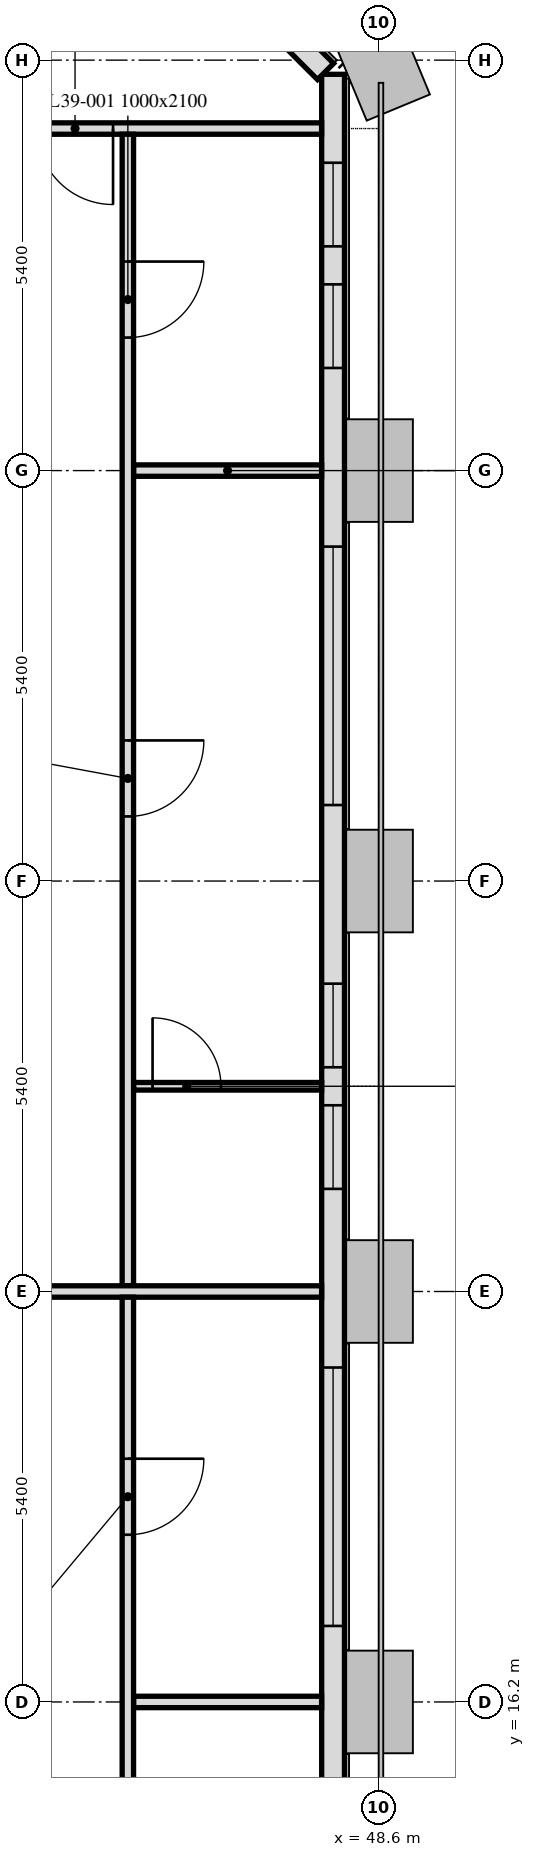
"""IFC4 building model, lengths in metres.
Left out: names, types, materials, properties, quantities, classifications, styles, units other than length and angle.
Written with IfcOpenShell. Run it as: python <this file> out.ifc"""

import sys

from ifc_helpers import new_model, si_unit, direction, frame, frame_2d, origin, place, context, subcontext, project, spatial, rectangle, extrude, element, fill, save


model = new_model("IFC4")
c1 = context("Model", 3, precision=1e-05, world=origin(), true_north=direction((0.0, 1.0)))
c2 = subcontext(c1, "Body", "Model", "MODEL_VIEW")
j1 = project(units=[si_unit("LENGTHUNIT", "METRE"), si_unit("PLANEANGLEUNIT", "RADIAN")], contexts=[c1])
p1 = place(None, origin())
s1 = spatial("IfcSite", under=j1, at=p1, CompositionType="ELEMENT")
p2 = place(p1, origin())
s2 = spatial("IfcBuilding", under=s1, at=p2, CompositionType="ELEMENT")
p3 = place(p2, frame((0.0, 0.0, 166.0)))
s3 = spatial("IfcBuildingStorey", under=s2, at=p3, CompositionType="ELEMENT", Elevation=166.0)
p4 = place(p3, frame((48.0, 5.586, 0.0), z_axis=(0.0, 0.0, 1.0), x_axis=(0.0, 1.0, 0.0)))
e1 = element("IfcWall", 1, at=p4, inside=s3, PredefinedType="SOLIDWALL", context=c2, shape_type="SweptSolid", body=[
    extrude(rectangle(XDim=32.027, YDim=0.3, at=frame_2d((16.014, 0.0))), origin(), (0.0, 0.0, 1.0), 3.0),
])
p5 = place(p4, frame((1.164, 0.0, 0.9)))
e2 = element("IfcOpeningElement", 2, at=p5, cuts=e1, PredefinedType="OPENING", context=c2, shape_type="SweptSolid", body=[
    extrude(rectangle(XDim=1.1, YDim=1.7, at=frame_2d((0.55, 0.85))), frame((0.0, 0.16, 0.0), z_axis=(0.0, -1.0, 0.0), x_axis=(1.0, 0.0, 0.0)), (0.0, 0.0, 1.0), 0.32),
])
p6 = place(p4, frame((2.589, 0.0, 0.9)))
e3 = element("IfcOpeningElement", 3, at=p6, cuts=e1, PredefinedType="OPENING", context=c2, shape_type="SweptSolid", body=[
    extrude(rectangle(XDim=0.65, YDim=1.7, at=frame_2d((0.325, 0.85))), frame((0.0, 0.16, 0.0), z_axis=(0.0, -1.0, 0.0), x_axis=(1.0, 0.0, 0.0)), (0.0, 0.0, 1.0), 0.32),
])
p7 = place(p4, frame((6.564, 0.0, 0.9)))
e4 = element("IfcOpeningElement", 4, at=p7, cuts=e1, PredefinedType="OPENING", context=c2, shape_type="SweptSolid", body=[
    extrude(rectangle(XDim=1.1, YDim=1.7, at=frame_2d((0.55, 0.85))), frame((0.0, 0.16, 0.0), z_axis=(0.0, -1.0, 0.0), x_axis=(1.0, 0.0, 0.0)), (0.0, 0.0, 1.0), 0.32),
])
p8 = place(p4, frame((8.164, 0.0, 0.9)))
e5 = element("IfcOpeningElement", 5, at=p8, cuts=e1, PredefinedType="OPENING", context=c2, shape_type="SweptSolid", body=[
    extrude(rectangle(XDim=1.1, YDim=1.7, at=frame_2d((0.55, 0.85))), frame((0.0, 0.16, 0.0), z_axis=(0.0, -1.0, 0.0), x_axis=(1.0, 0.0, 0.0)), (0.0, 0.0, 1.0), 0.32),
])
p9 = place(p4, frame((11.614, 0.0, 0.9)))
e6 = element("IfcOpeningElement", 6, at=p9, cuts=e1, PredefinedType="OPENING", context=c2, shape_type="SweptSolid", body=[
    extrude(rectangle(XDim=3.4, YDim=1.7, at=frame_2d((1.7, 0.85))), frame((0.0, 0.16, 0.0), z_axis=(0.0, -1.0, 0.0), x_axis=(1.0, 0.0, 0.0)), (0.0, 0.0, 1.0), 0.32),
])
p10 = place(p4, frame((17.364, 0.0, 0.9)))
e7 = element("IfcOpeningElement", 7, at=p10, cuts=e1, PredefinedType="OPENING", context=c2, shape_type="SweptSolid", body=[
    extrude(rectangle(XDim=1.1, YDim=1.7, at=frame_2d((0.55, 0.85))), frame((0.0, 0.16, 0.0), z_axis=(0.0, -1.0, 0.0), x_axis=(1.0, 0.0, 0.0)), (0.0, 0.0, 1.0), 0.32),
])
p11 = place(p4, frame((18.964, 0.0, 0.9)))
e8 = element("IfcOpeningElement", 8, at=p11, cuts=e1, PredefinedType="OPENING", context=c2, shape_type="SweptSolid", body=[
    extrude(rectangle(XDim=1.1, YDim=1.7, at=frame_2d((0.55, 0.85))), frame((0.0, 0.16, 0.0), z_axis=(0.0, -1.0, 0.0), x_axis=(1.0, 0.0, 0.0)), (0.0, 0.0, 1.0), 0.32),
])
p12 = place(p4, frame((22.414, 0.0, 0.9)))
e9 = element("IfcOpeningElement", 9, at=p12, cuts=e1, PredefinedType="OPENING", context=c2, shape_type="SweptSolid", body=[
    extrude(rectangle(XDim=3.4, YDim=1.7, at=frame_2d((1.7, 0.85))), frame((0.0, 0.16, 0.0), z_axis=(0.0, -1.0, 0.0), x_axis=(1.0, 0.0, 0.0)), (0.0, 0.0, 1.0), 0.32),
])
p13 = place(p4, frame((28.164, 0.0, 0.9)))
e10 = element("IfcOpeningElement", 10, at=p13, cuts=e1, PredefinedType="OPENING", context=c2, shape_type="SweptSolid", body=[
    extrude(rectangle(XDim=1.1, YDim=1.7, at=frame_2d((0.55, 0.85))), frame((0.0, 0.16, 0.0), z_axis=(0.0, -1.0, 0.0), x_axis=(1.0, 0.0, 0.0)), (0.0, 0.0, 1.0), 0.32),
])
p14 = place(p4, frame((29.764, 0.0, 0.9)))
e11 = element("IfcOpeningElement", 11, at=p14, cuts=e1, PredefinedType="OPENING", context=c2, shape_type="SweptSolid", body=[
    extrude(rectangle(XDim=1.1, YDim=1.7, at=frame_2d((0.55, 0.85))), frame((0.0, 0.16, 0.0), z_axis=(0.0, -1.0, 0.0), x_axis=(1.0, 0.0, 0.0)), (0.0, 0.0, 1.0), 0.32),
])
p15 = place(p3, frame((47.901, 37.65, 0.0), z_axis=(0.0, 0.0, 1.0), x_axis=(-0.707106781187, 0.707106781187, 0.0)))
e12 = element("IfcWall", 12, at=p15, inside=s3, PredefinedType="SOLIDWALL", context=c2, shape_type="SweptSolid", body=[
    extrude(rectangle(XDim=6.86, YDim=0.3, at=frame_2d((3.43, 0.0))), origin(), (0.0, 0.0, 1.0), 3.0),
])
p16 = place(p15, frame((1.73, 0.0, 0.9)))
e13 = element("IfcOpeningElement", 13, at=p16, cuts=e12, PredefinedType="OPENING", context=c2, shape_type="SweptSolid", body=[
    extrude(rectangle(XDim=3.4, YDim=1.7, at=frame_2d((1.7, 0.85))), frame((0.0, 0.16, 0.0), z_axis=(0.0, -1.0, 0.0), x_axis=(1.0, 0.0, 0.0)), (0.0, 0.0, 1.0), 0.32),
])
p17 = place(p3, frame((45.375, 32.4, 0.0), z_axis=(0.0, 0.0, 1.0), x_axis=(1.0, 0.0, 0.0)))
e14 = element("IfcWall", 14, at=p17, inside=s3, PredefinedType="PARTITIONING", context=c2, shape_type="SweptSolid", body=[
    extrude(rectangle(XDim=2.474, YDim=0.15, at=frame_2d((1.237, 0.0))), origin(), (0.0, 0.0, 1.0), 2.4),
])
p18 = place(p3, frame((47.849, 36.9, 0.0), z_axis=(0.0, 0.0, 1.0), x_axis=(-1.0, 0.0, 0.0)))
e15 = element("IfcWall", 15, at=p18, inside=s3, PredefinedType="PARTITIONING", context=c2, shape_type="SweptSolid", body=[
    extrude(rectangle(XDim=41.698, YDim=0.15, at=frame_2d((20.849, 0.0))), origin(), (0.0, 0.0, 1.0), 3.0),
])
p19 = place(p18, frame((39.249, 0.0, 0.0)))
e16 = element("IfcOpeningElement", 16, at=p19, cuts=e15, PredefinedType="OPENING", context=c2, shape_type="SweptSolid", body=[
    extrude(rectangle(XDim=1.0, YDim=2.1, at=frame_2d((0.5, 1.05))), frame((0.0, 0.075, 0.0), z_axis=(0.0, -1.0, 0.0), x_axis=(1.0, 0.0, 0.0)), (0.0, 0.0, 1.0), 0.15),
])
p20 = place(p18, frame((28.449, 0.0, 0.0)))
e17 = element("IfcOpeningElement", 17, at=p20, cuts=e15, PredefinedType="OPENING", context=c2, shape_type="SweptSolid", body=[
    extrude(rectangle(XDim=1.0, YDim=2.1, at=frame_2d((0.5, 1.05))), frame((0.0, 0.075, 0.0), z_axis=(0.0, -1.0, 0.0), x_axis=(1.0, 0.0, 0.0)), (0.0, 0.0, 1.0), 0.15),
])
p21 = place(p18, frame((16.849, 0.0, 0.0)))
e18 = element("IfcOpeningElement", 18, at=p21, cuts=e15, PredefinedType="OPENING", context=c2, shape_type="SweptSolid", body=[
    extrude(rectangle(XDim=1.0, YDim=2.1, at=frame_2d((0.5, 1.05))), frame((0.0, 0.075, 0.0), z_axis=(0.0, -1.0, 0.0), x_axis=(1.0, 0.0, 0.0)), (0.0, 0.0, 1.0), 0.15),
])
p22 = place(p18, frame((11.449, 0.0, 0.0)))
e19 = element("IfcOpeningElement", 19, at=p22, cuts=e15, PredefinedType="OPENING", context=c2, shape_type="SweptSolid", body=[
    extrude(rectangle(XDim=1.0, YDim=2.1, at=frame_2d((0.5, 1.05))), frame((0.0, 0.075, 0.0), z_axis=(0.0, -1.0, 0.0), x_axis=(1.0, 0.0, 0.0)), (0.0, 0.0, 1.0), 0.15),
])
p23 = place(p18, frame((2.744, 0.0, 0.0)))
e20 = element("IfcOpeningElement", 20, at=p23, cuts=e15, PredefinedType="OPENING", context=c2, shape_type="SweptSolid", body=[
    extrude(rectangle(XDim=1.0, YDim=2.1, at=frame_2d((0.5, 1.05))), frame((0.0, 0.075, 0.0), z_axis=(0.0, -1.0, 0.0), x_axis=(1.0, 0.0, 0.0)), (0.0, 0.0, 1.0), 0.15),
])
p24 = place(p3, frame((45.375, 24.3, 0.0), z_axis=(0.0, 0.0, 1.0), x_axis=(1.0, 0.0, 0.0)))
e21 = element("IfcWall", 21, at=p24, inside=s3, PredefinedType="PARTITIONING", context=c2, shape_type="SweptSolid", body=[
    extrude(rectangle(XDim=2.474, YDim=0.1, at=frame_2d((1.237, 0.0))), origin(), (0.0, 0.0, 1.0), 3.0),
])
p25 = place(p24, frame((0.25, 0.0, 0.0)))
e22 = element("IfcOpeningElement", 22, at=p25, cuts=e21, PredefinedType="OPENING", context=c2, shape_type="SweptSolid", body=[
    extrude(rectangle(XDim=0.9, YDim=2.1, at=frame_2d((0.45, 1.05))), frame((0.0, 0.05, 0.0), z_axis=(0.0, -1.0, 0.0), x_axis=(1.0, 0.0, 0.0)), (0.0, 0.0, 1.0), 0.1),
])
p26 = place(p3, frame((45.3, 36.825, 0.0), z_axis=(0.0, 0.0, 1.0), x_axis=(0.0, -1.0, 0.0)))
e23 = element("IfcWall", 23, at=p26, inside=s3, PredefinedType="PARTITIONING", context=c2, shape_type="SweptSolid", body=[
    extrude(rectangle(XDim=15.15, YDim=0.15, at=frame_2d((7.575, 0.0))), origin(), (0.0, 0.0, 1.0), 2.4),
])
p27 = place(p26, frame((1.675, 0.0, 0.0)))
e24 = element("IfcOpeningElement", 24, at=p27, cuts=e23, PredefinedType="OPENING", context=c2, shape_type="SweptSolid", body=[
    extrude(rectangle(XDim=1.0, YDim=2.1, at=frame_2d((0.5, 1.05))), frame((0.0, 0.075, 0.0), z_axis=(0.0, -1.0, 0.0), x_axis=(1.0, 0.0, 0.0)), (0.0, 0.0, 1.0), 0.15),
])
p28 = place(p26, frame((7.975, 0.0, 0.0)))
e25 = element("IfcOpeningElement", 25, at=p28, cuts=e23, PredefinedType="OPENING", context=c2, shape_type="SweptSolid", body=[
    extrude(rectangle(XDim=1.0, YDim=2.1, at=frame_2d((0.5, 1.05))), frame((0.0, 0.075, 0.0), z_axis=(0.0, -1.0, 0.0), x_axis=(1.0, 0.0, 0.0)), (0.0, 0.0, 1.0), 0.15),
])
p29 = place(p3, frame((43.2, 21.6, 0.0), z_axis=(0.0, 0.0, 1.0), x_axis=(1.0, 0.0, 0.0)))
e26 = element("IfcWall", 26, at=p29, inside=s3, PredefinedType="PARTITIONING", context=c2, shape_type="SweptSolid", body=[
    extrude(rectangle(XDim=4.649, YDim=0.15, at=frame_2d((2.325, 0.0))), origin(), (0.0, 0.0, 1.0), 2.4),
])
p30 = place(p3, frame((47.849, 16.2, 0.0), z_axis=(0.0, 0.0, 1.0), x_axis=(-1.0, 0.0, 0.0)))
e27 = element("IfcWall", 27, at=p30, inside=s3, PredefinedType="PARTITIONING", context=c2, shape_type="SweptSolid", body=[
    extrude(rectangle(XDim=2.474, YDim=0.15, at=frame_2d((1.237, 0.0))), origin(), (0.0, 0.0, 1.0), 2.4),
])
p31 = place(p3, frame((45.3, 21.525, 0.0), z_axis=(0.0, 0.0, 1.0), x_axis=(0.0, -1.0, 0.0)))
e28 = element("IfcWall", 28, at=p31, inside=s3, PredefinedType="PARTITIONING", context=c2, shape_type="SweptSolid", body=[
    extrude(rectangle(XDim=15.15, YDim=0.15, at=frame_2d((7.575, 0.0))), origin(), (0.0, 0.0, 1.0), 2.4),
])
p32 = place(p31, frame((2.125, 0.0, 0.0)))
e29 = element("IfcOpeningElement", 29, at=p32, cuts=e28, PredefinedType="OPENING", context=c2, shape_type="SweptSolid", body=[
    extrude(rectangle(XDim=1.0, YDim=2.1, at=frame_2d((0.5, 1.05))), frame((0.0, 0.075, 0.0), z_axis=(0.0, -1.0, 0.0), x_axis=(1.0, 0.0, 0.0)), (0.0, 0.0, 1.0), 0.15),
])
p33 = place(p31, frame((7.958, 0.0, 0.0)))
e30 = element("IfcOpeningElement", 30, at=p33, cuts=e28, PredefinedType="OPENING", context=c2, shape_type="SweptSolid", body=[
    extrude(rectangle(XDim=1.0, YDim=2.1, at=frame_2d((0.5, 1.05))), frame((0.0, 0.075, 0.0), z_axis=(0.0, -1.0, 0.0), x_axis=(1.0, 0.0, 0.0)), (0.0, 0.0, 1.0), 0.15),
])
p34 = place(p9, origin())
e31 = element("IfcWindow", 31, at=p34, inside=s3, PartitioningType="SINGLE_PANEL", PredefinedType="WINDOW", context=c2, shape_type="SweptSolid", body=[
    extrude(rectangle(XDim=3.4, YDim=1.7, at=frame_2d((1.7, 0.85))), frame((0.0, 0.03, 0.0), z_axis=(0.0, -1.0, 0.0), x_axis=(1.0, 0.0, 0.0)), (0.0, 0.0, 1.0), 0.06),
])
fill(e6, e31)
p35 = place(p10, origin())
e32 = element("IfcWindow", 32, at=p35, inside=s3, PartitioningType="SINGLE_PANEL", PredefinedType="WINDOW", context=c2, shape_type="SweptSolid", body=[
    extrude(rectangle(XDim=1.1, YDim=1.7, at=frame_2d((0.55, 0.85))), frame((0.0, 0.03, 0.0), z_axis=(0.0, -1.0, 0.0), x_axis=(1.0, 0.0, 0.0)), (0.0, 0.0, 1.0), 0.06),
])
fill(e7, e32)
p36 = place(p11, origin())
e33 = element("IfcWindow", 33, at=p36, inside=s3, PartitioningType="SINGLE_PANEL", PredefinedType="WINDOW", context=c2, shape_type="SweptSolid", body=[
    extrude(rectangle(XDim=1.1, YDim=1.7, at=frame_2d((0.55, 0.85))), frame((0.0, 0.03, 0.0), z_axis=(0.0, -1.0, 0.0), x_axis=(1.0, 0.0, 0.0)), (0.0, 0.0, 1.0), 0.06),
])
fill(e8, e33)
p37 = place(p12, origin())
e34 = element("IfcWindow", 34, at=p37, inside=s3, PartitioningType="SINGLE_PANEL", PredefinedType="WINDOW", context=c2, shape_type="SweptSolid", body=[
    extrude(rectangle(XDim=3.4, YDim=1.7, at=frame_2d((1.7, 0.85))), frame((0.0, 0.03, 0.0), z_axis=(0.0, -1.0, 0.0), x_axis=(1.0, 0.0, 0.0)), (0.0, 0.0, 1.0), 0.06),
])
fill(e9, e34)
p38 = place(p13, origin())
e35 = element("IfcWindow", 35, at=p38, inside=s3, PartitioningType="SINGLE_PANEL", PredefinedType="WINDOW", context=c2, shape_type="SweptSolid", body=[
    extrude(rectangle(XDim=1.1, YDim=1.7, at=frame_2d((0.55, 0.85))), frame((0.0, 0.03, 0.0), z_axis=(0.0, -1.0, 0.0), x_axis=(1.0, 0.0, 0.0)), (0.0, 0.0, 1.0), 0.06),
])
fill(e10, e35)
p39 = place(p14, origin())
e36 = element("IfcWindow", 36, at=p39, inside=s3, PartitioningType="SINGLE_PANEL", PredefinedType="WINDOW", context=c2, shape_type="SweptSolid", body=[
    extrude(rectangle(XDim=1.1, YDim=1.7, at=frame_2d((0.55, 0.85))), frame((0.0, 0.03, 0.0), z_axis=(0.0, -1.0, 0.0), x_axis=(1.0, 0.0, 0.0)), (0.0, 0.0, 1.0), 0.06),
])
fill(e11, e36)
p40 = place(p27, origin())
e37 = element("IfcDoor", 37, at=p40, inside=s3, OperationType="SINGLE_SWING_LEFT", PredefinedType="DOOR", context=c2, shape_type="SweptSolid", body=[
    extrude(rectangle(XDim=1.0, YDim=2.1, at=frame_2d((0.5, 1.05))), frame((0.0, 0.025, 0.0), z_axis=(0.0, -1.0, 0.0), x_axis=(1.0, 0.0, 0.0)), (0.0, 0.0, 1.0), 0.05),
])
fill(e24, e37)
p41 = place(p25, origin())
e38 = element("IfcDoor", 38, at=p41, inside=s3, OperationType="SINGLE_SWING_RIGHT", PredefinedType="DOOR", context=c2, shape_type="SweptSolid", body=[
    extrude(rectangle(XDim=0.9, YDim=2.1, at=frame_2d((0.45, 1.05))), frame((0.0, 0.025, 0.0), z_axis=(0.0, -1.0, 0.0), x_axis=(1.0, 0.0, 0.0)), (0.0, 0.0, 1.0), 0.05),
])
fill(e22, e38)
p42 = place(p32, origin())
e39 = element("IfcDoor", 39, at=p42, inside=s3, OperationType="SINGLE_SWING_RIGHT", PredefinedType="DOOR", context=c2, shape_type="SweptSolid", body=[
    extrude(rectangle(XDim=1.0, YDim=2.1, at=frame_2d((0.5, 1.05))), frame((0.0, 0.025, 0.0), z_axis=(0.0, -1.0, 0.0), x_axis=(1.0, 0.0, 0.0)), (0.0, 0.0, 1.0), 0.05),
])
fill(e29, e39)
p43 = place(p23, origin())
e40 = element("IfcDoor", 40, at=p43, inside=s3, OperationType="SINGLE_SWING_LEFT", PredefinedType="DOOR", context=c2, shape_type="SweptSolid", body=[
    extrude(rectangle(XDim=1.0, YDim=2.1, at=frame_2d((0.5, 1.05))), frame((0.0, 0.025, 0.0), z_axis=(0.0, -1.0, 0.0), x_axis=(1.0, 0.0, 0.0)), (0.0, 0.0, 1.0), 0.05),
])
fill(e20, e40)
p44 = place(p28, origin())
e41 = element("IfcDoor", 41, at=p44, inside=s3, OperationType="SINGLE_SWING_RIGHT", PredefinedType="DOOR", context=c2, shape_type="SweptSolid", body=[
    extrude(rectangle(XDim=1.0, YDim=2.1, at=frame_2d((0.5, 1.05))), frame((0.0, 0.025, 0.0), z_axis=(0.0, -1.0, 0.0), x_axis=(1.0, 0.0, 0.0)), (0.0, 0.0, 1.0), 0.05),
])
fill(e25, e41)
save(model, sys.argv[1])
